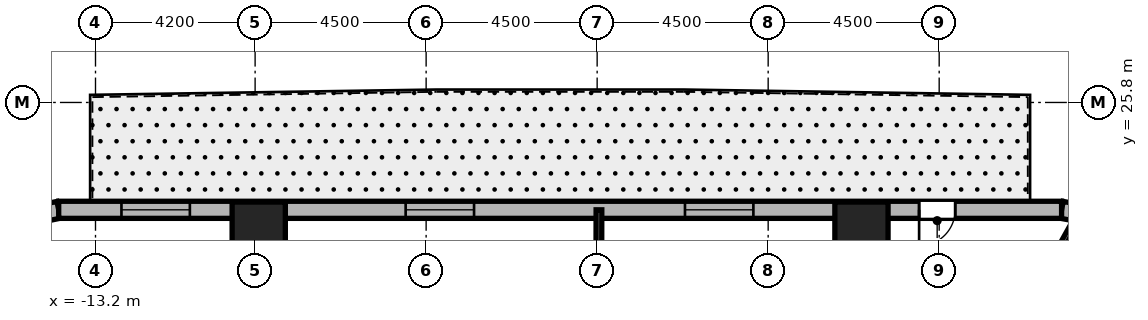
"""IFC4 building model, lengths in metres.
Left out: names, types, materials, properties, quantities, classifications, styles, units other than length and angle.
Written with IfcOpenShell. Run it as: python <this file> out.ifc"""

import sys

from ifc_helpers import new_model, si_unit, direction, frame, frame_2d, origin, origin_2d, place, context, subcontext, project, spatial, rectangle, extrude, element, fill, save


model = new_model("IFC4")
c1 = context("Model", 3, precision=1e-05, world=origin(), true_north=direction((0.0, 1.0)))
c2 = subcontext(c1, "Body", "Model", "MODEL_VIEW")
j1 = project(units=[si_unit("LENGTHUNIT", "METRE"), si_unit("PLANEANGLEUNIT", "RADIAN")], contexts=[c1])
p1 = place(None, origin())
s1 = spatial("IfcSite", under=j1, at=p1, CompositionType="ELEMENT")
p2 = place(p1, origin())
s2 = spatial("IfcBuilding", under=s1, at=p2, CompositionType="ELEMENT")
p3 = place(p2, frame((0.0, 0.0, 34.2)))
s3 = spatial("IfcBuildingStorey", under=s2, at=p3, CompositionType="ELEMENT", Elevation=34.2)
for number, where, z_axis, x_axis in (
    (1, (6.955, 22.48, 0.0), (0.0, 0.0, 1.0), (1.0, 0.0, 0.0)),
    (2, (-8.905, 22.48, 0.0), (0.0, 0.0, 1.0), (1.0, 0.0, 0.0)),
):
    element("IfcColumn", number, at=place(p3, frame(where, z_axis=z_axis, x_axis=x_axis)), inside=s3, PredefinedType="COLUMN", context=c2, shape_type="SweptSolid", body=[
        extrude(rectangle(XDim=1.4, YDim=1.4, at=origin_2d()), origin(), (0.0, 0.0, 1.0), 3.7),
    ])
p4 = place(p3, frame((13.468, 22.74, 0.0), z_axis=(0.0, 0.0, 1.0), x_axis=(-0.982717174228, 0.185113358451, 0.0)))
e3 = element("IfcWall", 3, at=p4, inside=s3, PredefinedType="SOLIDWALL", context=c2, shape_type="SweptSolid", body=[
    extrude(rectangle(XDim=1.269, YDim=0.45, at=frame_2d((0.634, 0.0))), origin(), (0.0, 0.0, 1.0), 3.4),
])
p5 = place(p3, frame((-14.168, 22.975, 0.0), z_axis=(0.0, 0.0, 1.0), x_axis=(-0.978770371074, -0.204959900243, 0.0)))
e4 = element("IfcWall", 4, at=p5, inside=s3, PredefinedType="SOLIDWALL", context=c2, shape_type="SweptSolid", body=[
    extrude(rectangle(XDim=1.406, YDim=0.45, at=frame_2d((0.703, 0.0))), origin(), (0.0, 0.0, 1.0), 3.4),
])
p6 = place(p3, frame((12.221, 22.975, 0.0), z_axis=(0.0, 0.0, 1.0), x_axis=(-1.0, 0.0, 0.0)))
e5 = element("IfcWall", 5, at=p6, inside=s3, PredefinedType="SOLIDWALL", context=c2, shape_type="SweptSolid", body=[
    extrude(rectangle(XDim=26.389, YDim=0.45, at=frame_2d((13.195, 0.0))), origin(), (0.0, 0.0, 1.0), 3.4),
])
p7 = place(p6, frame((2.799, 0.0, 0.0)))
e6 = element("IfcOpeningElement", 6, at=p7, cuts=e5, PredefinedType="OPENING", context=c2, shape_type="SweptSolid", body=[
    extrude(rectangle(XDim=0.95, YDim=2.15, at=frame_2d((0.475, 1.075))), frame((0.0, 0.235, 0.0), z_axis=(0.0, -1.0, 0.0), x_axis=(1.0, 0.0, 0.0)), (0.0, 0.0, 1.0), 0.47),
])
p8 = place(p6, frame((8.11, 0.0, 0.8)))
e7 = element("IfcOpeningElement", 7, at=p8, cuts=e5, PredefinedType="OPENING", context=c2, shape_type="SweptSolid", body=[
    extrude(rectangle(XDim=1.8, YDim=1.8, at=frame_2d((0.9, 0.9))), frame((0.0, 0.235, 0.0), z_axis=(0.0, -1.0, 0.0), x_axis=(1.0, 0.0, 0.0)), (0.0, 0.0, 1.0), 0.47),
])
p9 = place(p6, frame((15.46, 0.0, 0.8)))
e8 = element("IfcOpeningElement", 8, at=p9, cuts=e5, PredefinedType="OPENING", context=c2, shape_type="SweptSolid", body=[
    extrude(rectangle(XDim=1.8, YDim=1.8, at=frame_2d((0.9, 0.9))), frame((0.0, 0.235, 0.0), z_axis=(0.0, -1.0, 0.0), x_axis=(1.0, 0.0, 0.0)), (0.0, 0.0, 1.0), 0.47),
])
p10 = place(p6, frame((22.938, 0.0, 0.8)))
e9 = element("IfcOpeningElement", 9, at=p10, cuts=e5, PredefinedType="OPENING", context=c2, shape_type="SweptSolid", body=[
    extrude(rectangle(XDim=1.8, YDim=1.8, at=frame_2d((0.9, 0.9))), frame((0.0, 0.235, 0.0), z_axis=(0.0, -1.0, 0.0), x_axis=(1.0, 0.0, 0.0)), (0.0, 0.0, 1.0), 0.47),
])
p11 = place(p3, frame((5.471, 9.85, 0.0), z_axis=(0.0, 0.0, 1.0), x_axis=(0.48553323157, 0.874218211341, 0.0)))
e10 = element("IfcWall", 10, at=p11, inside=s3, PredefinedType="PARTITIONING", context=c2, shape_type="SweptSolid", body=[
    extrude(rectangle(XDim=14.74, YDim=0.15, at=frame_2d((7.37, 0.0))), origin(), (0.0, 0.0, 1.0), 2.54),
])
p12 = place(p3, frame((3.048, 9.85, 0.0), z_axis=(0.0, 0.0, 1.0), x_axis=(0.295553992761, 0.955326037206, 0.0)))
e11 = element("IfcWall", 11, at=p12, inside=s3, PredefinedType="PARTITIONING", context=c2, shape_type="SweptSolid", body=[
    extrude(rectangle(XDim=13.739, YDim=0.15, at=frame_2d((6.869, 0.0))), origin(), (0.0, 0.0, 1.0), 2.54),
])
p13 = place(p3, frame((0.021, 9.85, 0.0), z_axis=(0.0, 0.0, 1.0), x_axis=(0.002064727742, 0.999997868447, 0.0)))
e12 = element("IfcWall", 12, at=p13, inside=s3, PredefinedType="PARTITIONING", context=c2, shape_type="SweptSolid", body=[
    extrude(rectangle(XDim=13.125, YDim=0.15, at=frame_2d((6.562, 0.0))), origin(), (0.0, 0.0, 1.0), 2.54),
])
p14 = place(p3, frame((-3.902, 9.85, 0.0), z_axis=(0.0, 0.0, 1.0), x_axis=(-0.36828765711, 0.929711891728, 0.0)))
e13 = element("IfcWall", 13, at=p14, inside=s3, PredefinedType="PARTITIONING", context=c2, shape_type="SweptSolid", body=[
    extrude(rectangle(XDim=14.117, YDim=0.15, at=frame_2d((7.059, 0.0))), origin(), (0.0, 0.0, 1.0), 2.54),
])
p15 = place(p7, origin())
e14 = element("IfcDoor", 14, at=p15, inside=s3, OperationType="SINGLE_SWING_RIGHT", PredefinedType="DOOR", context=c2, shape_type="SweptSolid", body=[
    extrude(rectangle(XDim=0.95, YDim=2.15, at=frame_2d((0.475, 1.075))), frame((0.0, 0.025, 0.0), z_axis=(0.0, -1.0, 0.0), x_axis=(1.0, 0.0, 0.0)), (0.0, 0.0, 1.0), 0.05),
])
fill(e6, e14)
p16 = place(p8, origin())
e15 = element("IfcWindow", 15, at=p16, inside=s3, PartitioningType="SINGLE_PANEL", PredefinedType="WINDOW", context=c2, shape_type="SweptSolid", body=[
    extrude(rectangle(XDim=1.8, YDim=1.8, at=frame_2d((0.9, 0.9))), frame((0.0, 0.03, 0.0), z_axis=(0.0, -1.0, 0.0), x_axis=(1.0, 0.0, 0.0)), (0.0, 0.0, 1.0), 0.06),
])
fill(e7, e15)
p17 = place(p9, origin())
e16 = element("IfcWindow", 16, at=p17, inside=s3, PartitioningType="SINGLE_PANEL", PredefinedType="WINDOW", context=c2, shape_type="SweptSolid", body=[
    extrude(rectangle(XDim=1.8, YDim=1.8, at=frame_2d((0.9, 0.9))), frame((0.0, 0.03, 0.0), z_axis=(0.0, -1.0, 0.0), x_axis=(1.0, 0.0, 0.0)), (0.0, 0.0, 1.0), 0.06),
])
fill(e8, e16)
p18 = place(p10, origin())
e17 = element("IfcWindow", 17, at=p18, inside=s3, PartitioningType="SINGLE_PANEL", PredefinedType="WINDOW", context=c2, shape_type="SweptSolid", body=[
    extrude(rectangle(XDim=1.8, YDim=1.8, at=frame_2d((0.9, 0.9))), frame((0.0, 0.03, 0.0), z_axis=(0.0, -1.0, 0.0), x_axis=(1.0, 0.0, 0.0)), (0.0, 0.0, 1.0), 0.06),
])
fill(e9, e17)
save(model, sys.argv[1])
